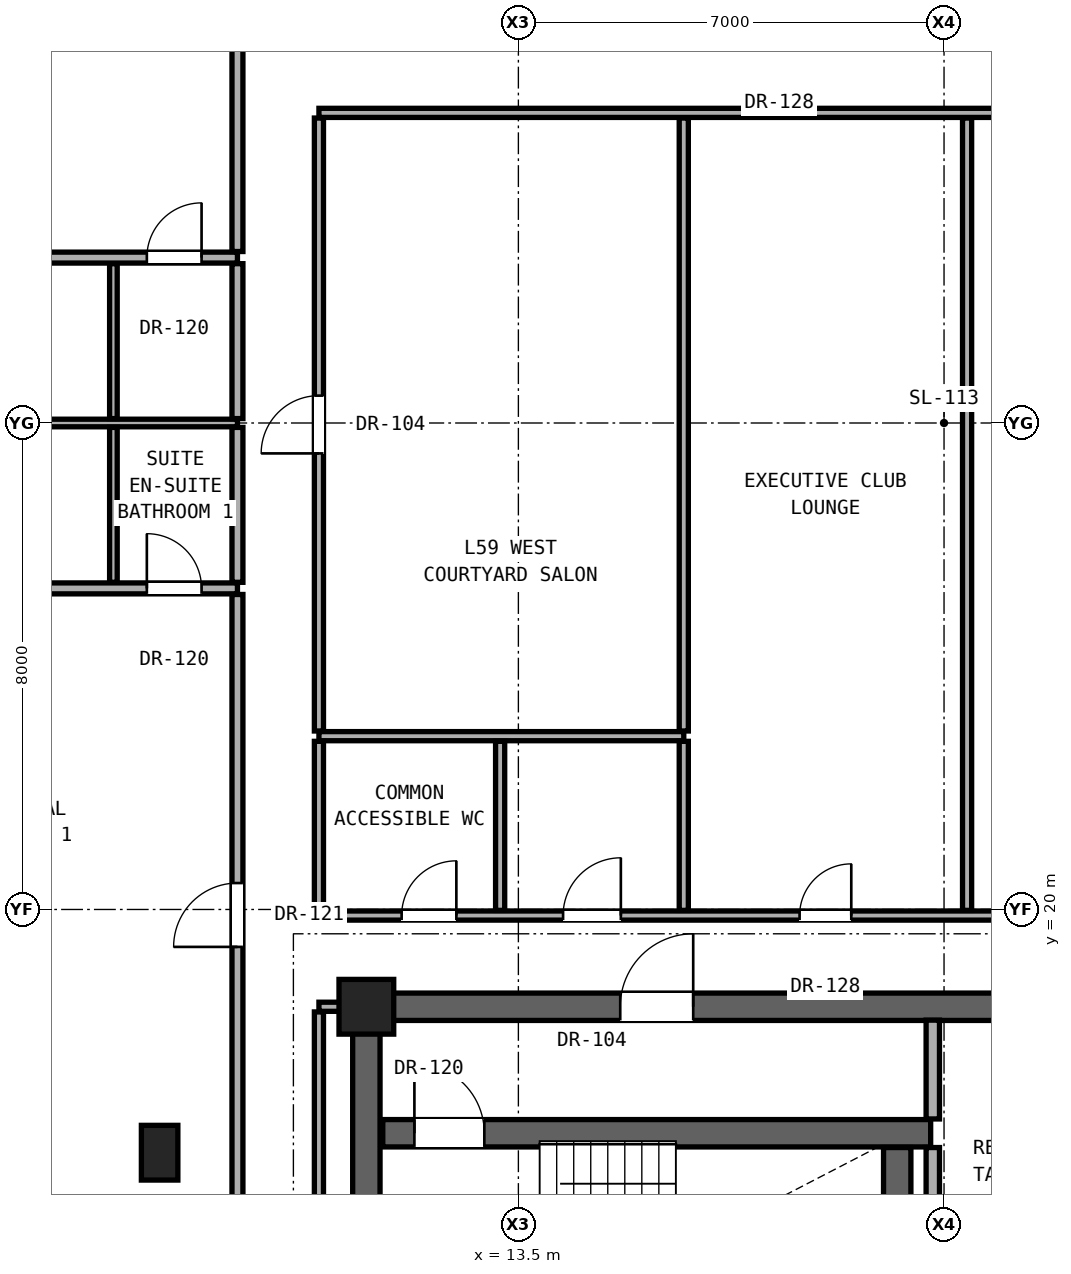
"""IFC4 building model, lengths in metres.
Left out: names, types, materials, properties, quantities, classifications, styles, units other than length and angle.
Written with IfcOpenShell. Run it as: python <this file> out.ifc"""

import sys

from ifc_helpers import new_model, si_unit, direction, frame, frame_2d, origin, origin_2d, place, context, subcontext, project, spatial, rectangle, extrude, element, fill, save


model = new_model("IFC4")
c1 = context("Model", 3, precision=1e-05, world=origin(), true_north=direction((0.0, 1.0)))
c2 = subcontext(c1, "Body", "Model", "MODEL_VIEW")
j1 = project(units=[si_unit("LENGTHUNIT", "METRE"), si_unit("PLANEANGLEUNIT", "RADIAN")], contexts=[c1])
p1 = place(None, origin())
s1 = spatial("IfcSite", under=j1, at=p1, CompositionType="ELEMENT")
p2 = place(p1, origin())
s2 = spatial("IfcBuilding", under=s1, at=p2, CompositionType="ELEMENT")
p3 = place(p2, frame((0.0, 0.0, 206.4)))
s3 = spatial("IfcBuildingStorey", under=s2, at=p3, CompositionType="ELEMENT", Elevation=206.4)
p4 = place(p3, frame((11.0, 18.4, 0.0), z_axis=(0.0, 0.0, 1.0), x_axis=(1.0, 0.0, 0.0)))
e1 = element("IfcColumn", 1, at=p4, inside=s3, PredefinedType="COLUMN", context=c2, shape_type="SweptSolid", body=[
    extrude(rectangle(XDim=0.9, YDim=0.9, at=origin_2d()), origin(), (0.0, 0.0, 1.0), 3.25),
])
p5 = place(p3, frame((7.6, 16.0, 0.0), z_axis=(0.0, 0.0, 1.0), x_axis=(1.0, 0.0, 0.0)))
e2 = element("IfcColumn", 2, at=p5, inside=s3, PredefinedType="PILASTER", context=c2, shape_type="SweptSolid", body=[
    extrude(rectangle(XDim=0.6, YDim=0.9, at=origin_2d()), origin(), (0.0, 0.0, 1.0), 3.25),
])
p6 = place(p3, frame((11.0, 12.4, 0.0), z_axis=(0.0, 0.0, 1.0), x_axis=(0.0, 1.0, 0.0)))
e3 = element("IfcWall", 3, at=p6, inside=s3, PredefinedType="SHEAR", context=c2, shape_type="SweptSolid", body=[
    extrude(rectangle(XDim=6.0, YDim=0.45, at=frame_2d((3.0, 0.0))), origin(), (0.0, 0.0, 1.0), 3.05),
])
p7 = place(p3, frame((11.0, 18.4, 0.0), z_axis=(0.0, 0.0, 1.0), x_axis=(1.0, 0.0, 0.0)))
e4 = element("IfcWall", 4, at=p7, inside=s3, PredefinedType="SHEAR", context=c2, shape_type="SweptSolid", body=[
    extrude(rectangle(XDim=19.0, YDim=0.45, at=frame_2d((9.5, 0.0))), origin(), (0.0, 0.0, 1.0), 3.05),
])
p8 = place(p7, frame((4.175, 0.0, 0.0)))
e5 = element("IfcOpeningElement", 5, at=p8, cuts=e4, PredefinedType="OPENING", context=c2, shape_type="SweptSolid", body=[
    extrude(rectangle(XDim=1.2, YDim=2.25, at=frame_2d((0.6, 1.125))), frame((0.0, 0.235, 0.0), z_axis=(0.0, -1.0, 0.0), x_axis=(1.0, 0.0, 0.0)), (0.0, 0.0, 1.0), 0.47),
])
p9 = place(p7, frame((11.075, 0.0, 0.0)))
e6 = element("IfcOpeningElement", 6, at=p9, cuts=e4, PredefinedType="OPENING", context=c2, shape_type="SweptSolid", body=[
    extrude(rectangle(XDim=0.95, YDim=2.15, at=frame_2d((0.475, 1.075))), frame((0.0, 0.235, 0.0), z_axis=(0.0, -1.0, 0.0), x_axis=(1.0, 0.0, 0.0)), (0.0, 0.0, 1.0), 0.47),
])
p10 = place(p7, frame((14.3, 0.0, 0.0)))
e7 = element("IfcOpeningElement", 7, at=p10, cuts=e4, PredefinedType="OPENING", context=c2, shape_type="SweptSolid", body=[
    extrude(rectangle(XDim=1.3, YDim=2.3, at=frame_2d((0.65, 1.15))), frame((0.0, 0.235, 0.0), z_axis=(0.0, -1.0, 0.0), x_axis=(1.0, 0.0, 0.0)), (0.0, 0.0, 1.0), 0.47),
])
p11 = place(p7, frame((16.6, 0.0, 0.0)))
e8 = element("IfcOpeningElement", 8, at=p11, cuts=e4, PredefinedType="OPENING", context=c2, shape_type="SweptSolid", body=[
    extrude(rectangle(XDim=1.3, YDim=2.3, at=frame_2d((0.65, 1.15))), frame((0.0, 0.235, 0.0), z_axis=(0.0, -1.0, 0.0), x_axis=(1.0, 0.0, 0.0)), (0.0, 0.0, 1.0), 0.47),
])
p12 = place(p3, frame((11.27, 16.32, 0.0), z_axis=(0.0, 0.0, 1.0), x_axis=(1.0, 0.0, 0.0)))
e9 = element("IfcWall", 9, at=p12, inside=s3, PredefinedType="SHEAR", context=c2, shape_type="SweptSolid", body=[
    extrude(rectangle(XDim=9.01, YDim=0.45, at=frame_2d((4.505, 0.0))), origin(), (0.0, 0.0, 1.0), 3.05),
])
p13 = place(p12, frame((0.52, 0.0, 0.0)))
e10 = element("IfcOpeningElement", 10, at=p13, cuts=e9, PredefinedType="OPENING", context=c2, shape_type="SweptSolid", body=[
    extrude(rectangle(XDim=1.15, YDim=2.2, at=frame_2d((0.575, 1.1))), frame((0.0, 0.235, 0.0), z_axis=(0.0, -1.0, 0.0), x_axis=(1.0, 0.0, 0.0)), (0.0, 0.0, 1.0), 0.47),
])
p14 = place(p3, frame((10.22, 18.4, 0.0), z_axis=(0.0, 0.0, 1.0), x_axis=(1.0, 0.0, 0.0)))
e11 = element("IfcWall", 11, at=p14, inside=s3, PredefinedType="PARTITIONING", context=c2, shape_type="SweptSolid", body=[
    extrude(rectangle(XDim=0.56, YDim=0.15, at=frame_2d((0.28, 0.0))), origin(), (0.0, 0.0, 1.0), 2.442),
])
p15 = place(p3, frame((10.22, 19.9, 0.0), z_axis=(0.0, 0.0, 1.0), x_axis=(1.0, 0.0, 0.0)))
e12 = element("IfcWall", 12, at=p15, inside=s3, PredefinedType="PARTITIONING", context=c2, shape_type="SweptSolid", body=[
    extrude(rectangle(XDim=20.56, YDim=0.15, at=frame_2d((10.28, 0.0))), origin(), (0.0, 0.0, 1.0), 2.186),
])
p16 = place(p15, frame((1.36, 0.0, 0.0)))
e13 = element("IfcOpeningElement", 13, at=p16, cuts=e12, PredefinedType="OPENING", context=c2, shape_type="SweptSolid", body=[
    extrude(rectangle(XDim=0.9, YDim=2.1, at=frame_2d((0.45, 1.05))), frame((0.0, 0.085, 0.0), z_axis=(0.0, -1.0, 0.0), x_axis=(1.0, 0.0, 0.0)), (0.0, 0.0, 1.0), 0.17),
])
p17 = place(p15, frame((4.015, 0.0, 0.0)))
e14 = element("IfcOpeningElement", 14, at=p17, cuts=e12, PredefinedType="OPENING", context=c2, shape_type="SweptSolid", body=[
    extrude(rectangle(XDim=0.95, YDim=2.15, at=frame_2d((0.475, 1.075))), frame((0.0, 0.085, 0.0), z_axis=(0.0, -1.0, 0.0), x_axis=(1.0, 0.0, 0.0)), (0.0, 0.0, 1.0), 0.17),
])
p18 = place(p15, frame((7.905, 0.0, 0.0)))
e15 = element("IfcOpeningElement", 15, at=p18, cuts=e12, PredefinedType="OPENING", context=c2, shape_type="SweptSolid", body=[
    extrude(rectangle(XDim=0.85, YDim=2.01, at=frame_2d((0.425, 1.005))), frame((0.0, 0.085, 0.0), z_axis=(0.0, -1.0, 0.0), x_axis=(1.0, 0.0, 0.0)), (0.0, 0.0, 1.0), 0.17),
])
p19 = place(p3, frame((10.22, 22.85, 0.0), z_axis=(0.0, 0.0, 1.0), x_axis=(1.0, 0.0, 0.0)))
e16 = element("IfcWall", 16, at=p19, inside=s3, PredefinedType="PARTITIONING", context=c2, shape_type="SweptSolid", body=[
    extrude(rectangle(XDim=6.0, YDim=0.15, at=frame_2d((3.0, 0.0))), origin(), (0.0, 0.0, 1.0), 2.186),
])
p20 = place(p3, frame((-0.79, 25.28, 0.0), z_axis=(0.0, 0.0, 1.0), x_axis=(1.0, 0.0, 0.0)))
e17 = element("IfcWall", 17, at=p20, inside=s3, PredefinedType="PARTITIONING", context=c2, shape_type="SweptSolid", body=[
    extrude(rectangle(XDim=9.67, YDim=0.18, at=frame_2d((4.835, 0.0))), origin(), (0.0, 0.0, 1.0), 2.269),
])
p21 = place(p20, frame((3.66, 0.0, 0.0)))
e18 = element("IfcOpeningElement", 18, at=p21, cuts=e17, PredefinedType="OPENING", context=c2, shape_type="SweptSolid", body=[
    extrude(rectangle(XDim=0.95, YDim=2.15, at=frame_2d((0.475, 1.075))), frame((0.0, 0.1, 0.0), z_axis=(0.0, -1.0, 0.0), x_axis=(1.0, 0.0, 0.0)), (0.0, 0.0, 1.0), 0.2),
])
p22 = place(p20, frame((8.18, 0.0, 0.0)))
e19 = element("IfcOpeningElement", 19, at=p22, cuts=e17, PredefinedType="OPENING", context=c2, shape_type="SweptSolid", body=[
    extrude(rectangle(XDim=0.9, YDim=2.1, at=frame_2d((0.45, 1.05))), frame((0.0, 0.1, 0.0), z_axis=(0.0, -1.0, 0.0), x_axis=(1.0, 0.0, 0.0)), (0.0, 0.0, 1.0), 0.2),
])
p23 = place(p3, frame((-0.79, 28.0, 0.0), z_axis=(0.0, 0.0, 1.0), x_axis=(1.0, 0.0, 0.0)))
e20 = element("IfcWall", 20, at=p23, inside=s3, PredefinedType="PARTITIONING", context=c2, shape_type="SweptSolid", body=[
    extrude(rectangle(XDim=9.67, YDim=0.125, at=frame_2d((4.835, 0.0))), origin(), (0.0, 0.0, 1.0), 2.269),
])
p24 = place(p3, frame((-0.79, 30.72, 0.0), z_axis=(0.0, 0.0, 1.0), x_axis=(1.0, 0.0, 0.0)))
e21 = element("IfcWall", 21, at=p24, inside=s3, PredefinedType="PARTITIONING", context=c2, shape_type="SweptSolid", body=[
    extrude(rectangle(XDim=9.67, YDim=0.18, at=frame_2d((4.835, 0.0))), origin(), (0.0, 0.0, 1.0), 2.269),
])
p25 = place(p24, frame((3.66, 0.0, 0.0)))
e22 = element("IfcOpeningElement", 22, at=p25, cuts=e21, PredefinedType="OPENING", context=c2, shape_type="SweptSolid", body=[
    extrude(rectangle(XDim=0.95, YDim=2.15, at=frame_2d((0.475, 1.075))), frame((0.0, 0.1, 0.0), z_axis=(0.0, -1.0, 0.0), x_axis=(1.0, 0.0, 0.0)), (0.0, 0.0, 1.0), 0.2),
])
p26 = place(p24, frame((8.18, 0.0, 0.0)))
e23 = element("IfcOpeningElement", 23, at=p26, cuts=e21, PredefinedType="OPENING", context=c2, shape_type="SweptSolid", body=[
    extrude(rectangle(XDim=0.9, YDim=2.1, at=frame_2d((0.45, 1.05))), frame((0.0, 0.1, 0.0), z_axis=(0.0, -1.0, 0.0), x_axis=(1.0, 0.0, 0.0)), (0.0, 0.0, 1.0), 0.2),
])
p27 = place(p3, frame((10.22, 33.1, 0.0), z_axis=(0.0, 0.0, 1.0), x_axis=(1.0, 0.0, 0.0)))
e24 = element("IfcWall", 24, at=p27, inside=s3, PredefinedType="PARTITIONING", context=c2, shape_type="SweptSolid", body=[
    extrude(rectangle(XDim=20.56, YDim=0.15, at=frame_2d((10.28, 0.0))), origin(), (0.0, 0.0, 1.0), 2.186),
])
p28 = place(p27, frame((12.782, 0.0, 0.0)))
e25 = element("IfcOpeningElement", 25, at=p28, cuts=e24, PredefinedType="OPENING", context=c2, shape_type="SweptSolid", body=[
    extrude(rectangle(XDim=0.85, YDim=2.01, at=frame_2d((0.425, 1.005))), frame((0.0, 0.085, 0.0), z_axis=(0.0, -1.0, 0.0), x_axis=(1.0, 0.0, 0.0)), (0.0, 0.0, 1.0), 0.17),
])
p29 = place(p27, frame((17.712, 0.0, 0.0)))
e26 = element("IfcOpeningElement", 26, at=p29, cuts=e24, PredefinedType="OPENING", context=c2, shape_type="SweptSolid", body=[
    extrude(rectangle(XDim=0.85, YDim=2.01, at=frame_2d((0.425, 1.005))), frame((0.0, 0.085, 0.0), z_axis=(0.0, -1.0, 0.0), x_axis=(1.0, 0.0, 0.0)), (0.0, 0.0, 1.0), 0.17),
])
for number, where, z_axis, x_axis in (
    (27, (6.84, 25.38, 0.0), (0.0, 0.0, 1.0), (0.0, 1.0, 0.0)),
    (28, (6.84, 28.073, 0.0), (0.0, 0.0, 1.0), (0.0, 1.0, 0.0)),
):
    element("IfcWall", number, at=place(p3, frame(where, z_axis=z_axis, x_axis=x_axis)), inside=s3, PredefinedType="PARTITIONING", context=c2, shape_type="SweptSolid", body=[
        extrude(rectangle(XDim=2.548, YDim=0.125, at=frame_2d((1.274, 0.0))), origin(), (0.0, 0.0, 1.0), 3.05),
    ])
p30 = place(p3, frame((8.88, 14.639, 0.0), z_axis=(0.0, 0.0, 1.0), x_axis=(0.0, 1.0, 0.0)))
e29 = element("IfcWall", 29, at=p30, inside=s3, PredefinedType="PARTITIONING", context=c2, shape_type="SweptSolid", body=[
    extrude(rectangle(XDim=10.541, YDim=0.18, at=frame_2d((5.271, 0.0))), origin(), (0.0, 0.0, 1.0), 2.346),
])
p31 = place(p30, frame((4.746, 0.0, 0.0)))
e30 = element("IfcOpeningElement", 30, at=p31, cuts=e29, PredefinedType="OPENING", context=c2, shape_type="SweptSolid", body=[
    extrude(rectangle(XDim=1.05, YDim=2.2, at=frame_2d((0.525, 1.1))), frame((0.0, 0.1, 0.0), z_axis=(0.0, -1.0, 0.0), x_axis=(1.0, 0.0, 0.0)), (0.0, 0.0, 1.0), 0.2),
])
for number, where, z_axis, x_axis in (
    (31, (8.88, 25.38, 0.0), (0.0, 0.0, 1.0), (0.0, 1.0, 0.0)),
    (32, (8.88, 28.073, 0.0), (0.0, 0.0, 1.0), (0.0, 1.0, 0.0)),
):
    element("IfcWall", number, at=place(p3, frame(where, z_axis=z_axis, x_axis=x_axis)), inside=s3, PredefinedType="PARTITIONING", context=c2, shape_type="SweptSolid", body=[
        extrude(rectangle(XDim=2.548, YDim=0.18, at=frame_2d((1.274, 0.0))), origin(), (0.0, 0.0, 1.0), 3.05),
    ])
p32 = place(p3, frame((8.88, 30.82, 0.0), z_axis=(0.0, 0.0, 1.0), x_axis=(0.0, 1.0, 0.0)))
e33 = element("IfcWall", 33, at=p32, inside=s3, PredefinedType="PARTITIONING", context=c2, shape_type="SweptSolid", body=[
    extrude(rectangle(XDim=10.541, YDim=0.18, at=frame_2d((5.271, 0.0))), origin(), (0.0, 0.0, 1.0), 2.346),
])
p33 = place(p32, frame((4.746, 0.0, 0.0)))
e34 = element("IfcOpeningElement", 34, at=p33, cuts=e33, PredefinedType="OPENING", context=c2, shape_type="SweptSolid", body=[
    extrude(rectangle(XDim=1.05, YDim=2.2, at=frame_2d((0.525, 1.1))), frame((0.0, 0.1, 0.0), z_axis=(0.0, -1.0, 0.0), x_axis=(1.0, 0.0, 0.0)), (0.0, 0.0, 1.0), 0.2),
])
p34 = place(p3, frame((10.22, 12.335, 0.0), z_axis=(0.0, 0.0, 1.0), x_axis=(0.0, 1.0, 0.0)))
e35 = element("IfcWall", 35, at=p34, inside=s3, PredefinedType="PARTITIONING", context=c2, shape_type="SweptSolid", body=[
    extrude(rectangle(XDim=5.98, YDim=0.15, at=frame_2d((2.99, 0.0))), origin(), (0.0, 0.0, 1.0), 2.442),
])
p35 = place(p3, frame((10.22, 19.985, 0.0), z_axis=(0.0, 0.0, 1.0), x_axis=(0.0, 1.0, 0.0)))
e36 = element("IfcWall", 36, at=p35, inside=s3, PredefinedType="PARTITIONING", context=c2, shape_type="SweptSolid", body=[
    extrude(rectangle(XDim=2.78, YDim=0.15, at=frame_2d((1.39, 0.0))), origin(), (0.0, 0.0, 1.0), 3.05),
])
p36 = place(p3, frame((10.22, 22.935, 0.0), z_axis=(0.0, 0.0, 1.0), x_axis=(0.0, 1.0, 0.0)))
e37 = element("IfcWall", 37, at=p36, inside=s3, PredefinedType="PARTITIONING", context=c2, shape_type="SweptSolid", body=[
    extrude(rectangle(XDim=10.08, YDim=0.15, at=frame_2d((5.04, 0.0))), origin(), (0.0, 0.0, 1.0), 2.346),
])
p37 = place(p36, frame((4.565, 0.0, 0.0)))
e38 = element("IfcOpeningElement", 38, at=p37, cuts=e37, PredefinedType="OPENING", context=c2, shape_type="SweptSolid", body=[
    extrude(rectangle(XDim=0.95, YDim=2.15, at=frame_2d((0.475, 1.075))), frame((0.0, 0.085, 0.0), z_axis=(0.0, -1.0, 0.0), x_axis=(1.0, 0.0, 0.0)), (0.0, 0.0, 1.0), 0.17),
])
for number, where, z_axis, x_axis in (
    (39, (13.2, 19.985, 0.0), (0.0, 0.0, 1.0), (0.0, 1.0, 0.0)),
    (40, (16.22, 19.985, 0.0), (0.0, 0.0, 1.0), (0.0, 1.0, 0.0)),
):
    element("IfcWall", number, at=place(p3, frame(where, z_axis=z_axis, x_axis=x_axis)), inside=s3, PredefinedType="PARTITIONING", context=c2, shape_type="SweptSolid", body=[
        extrude(rectangle(XDim=2.78, YDim=0.15, at=frame_2d((1.39, 0.0))), origin(), (0.0, 0.0, 1.0), 3.05),
    ])
p38 = place(p3, frame((16.22, 22.935, 0.0), z_axis=(0.0, 0.0, 1.0), x_axis=(0.0, 1.0, 0.0)))
e41 = element("IfcWall", 41, at=p38, inside=s3, PredefinedType="PARTITIONING", context=c2, shape_type="SweptSolid", body=[
    extrude(rectangle(XDim=10.08, YDim=0.15, at=frame_2d((5.04, 0.0))), origin(), (0.0, 0.0, 1.0), 2.186),
])
p39 = place(p3, frame((19.73, 13.355, 0.0), z_axis=(0.0, 0.0, 1.0), x_axis=(0.0, 1.0, 0.0)))
e42 = element("IfcWall", 42, at=p39, inside=s3, PredefinedType="SHEAR", context=c2, shape_type="SweptSolid", body=[
    extrude(rectangle(XDim=2.73, YDim=0.45, at=frame_2d((1.365, 0.0))), origin(), (0.0, 0.0, 1.0), 3.05),
])
p40 = place(p3, frame((20.315, 12.885, 0.0), z_axis=(0.0, 0.0, 1.0), x_axis=(0.0, 1.0, 0.0)))
e43 = element("IfcWall", 43, at=p40, inside=s3, PredefinedType="SOLIDWALL", context=c2, shape_type="SweptSolid", body=[
    extrude(rectangle(XDim=3.2, YDim=0.22, at=frame_2d((1.6, 0.0))), origin(), (0.0, 0.0, 1.0), 3.05),
])
p41 = place(p3, frame((20.315, 16.555, 0.0), z_axis=(0.0, 0.0, 1.0), x_axis=(0.0, 1.0, 0.0)))
e44 = element("IfcWall", 44, at=p41, inside=s3, PredefinedType="SOLIDWALL", context=c2, shape_type="SweptSolid", body=[
    extrude(rectangle(XDim=1.625, YDim=0.22, at=frame_2d((0.812, 0.0))), origin(), (0.0, 0.0, 1.0), 3.05),
])
p42 = place(p3, frame((20.879, 19.985, 0.0), z_axis=(0.0, 0.0, 1.0), x_axis=(0.0, 1.0, 0.0)))
e45 = element("IfcWall", 45, at=p42, inside=s3, PredefinedType="PARTITIONING", context=c2, shape_type="SweptSolid", body=[
    extrude(rectangle(XDim=13.03, YDim=0.15, at=frame_2d((6.515, 0.0))), origin(), (0.0, 0.0, 1.0), 2.186),
])
p43 = place(p8, origin())
e46 = element("IfcDoor", 46, at=p43, inside=s3, OperationType="SINGLE_SWING_RIGHT", PredefinedType="DOOR", context=c2, shape_type="SweptSolid", body=[
    extrude(rectangle(XDim=1.2, YDim=2.25, at=frame_2d((0.6, 1.125))), frame((0.0, 0.025, 0.0), z_axis=(0.0, -1.0, 0.0), x_axis=(1.0, 0.0, 0.0)), (0.0, 0.0, 1.0), 0.05),
])
fill(e5, e46)
p44 = place(p13, origin())
e47 = element("IfcDoor", 47, at=p44, inside=s3, OperationType="SINGLE_SWING_LEFT", PredefinedType="DOOR", context=c2, shape_type="SweptSolid", body=[
    extrude(rectangle(XDim=1.15, YDim=2.2, at=frame_2d((0.575, 1.1))), frame((0.0, 0.025, 0.0), z_axis=(0.0, -1.0, 0.0), x_axis=(1.0, 0.0, 0.0)), (0.0, 0.0, 1.0), 0.05),
])
fill(e10, e47)
p45 = place(p16, origin())
e48 = element("IfcDoor", 48, at=p45, inside=s3, OperationType="SINGLE_SWING_RIGHT", PredefinedType="DOOR", context=c2, shape_type="SweptSolid", body=[
    extrude(rectangle(XDim=0.9, YDim=2.1, at=frame_2d((0.45, 1.05))), frame((0.0, 0.025, 0.0), z_axis=(0.0, -1.0, 0.0), x_axis=(1.0, 0.0, 0.0)), (0.0, 0.0, 1.0), 0.05),
])
fill(e13, e48)
p46 = place(p31, origin())
e49 = element("IfcDoor", 49, at=p46, inside=s3, OperationType="SINGLE_SWING_LEFT", PredefinedType="DOOR", context=c2, shape_type="SweptSolid", body=[
    extrude(rectangle(XDim=1.05, YDim=2.2, at=frame_2d((0.525, 1.1))), frame((0.0, 0.025, 0.0), z_axis=(0.0, -1.0, 0.0), x_axis=(1.0, 0.0, 0.0)), (0.0, 0.0, 1.0), 0.05),
])
fill(e30, e49)
p47 = place(p22, origin())
e50 = element("IfcDoor", 50, at=p47, inside=s3, OperationType="SINGLE_SWING_LEFT", PredefinedType="DOOR", context=c2, shape_type="SweptSolid", body=[
    extrude(rectangle(XDim=0.9, YDim=2.1, at=frame_2d((0.45, 1.05))), frame((0.0, 0.025, 0.0), z_axis=(0.0, -1.0, 0.0), x_axis=(1.0, 0.0, 0.0)), (0.0, 0.0, 1.0), 0.05),
])
fill(e19, e50)
p48 = place(p26, origin())
e51 = element("IfcDoor", 51, at=p48, inside=s3, OperationType="SINGLE_SWING_RIGHT", PredefinedType="DOOR", context=c2, shape_type="SweptSolid", body=[
    extrude(rectangle(XDim=0.9, YDim=2.1, at=frame_2d((0.45, 1.05))), frame((0.0, 0.025, 0.0), z_axis=(0.0, -1.0, 0.0), x_axis=(1.0, 0.0, 0.0)), (0.0, 0.0, 1.0), 0.05),
])
fill(e23, e51)
p49 = place(p17, origin())
e52 = element("IfcDoor", 52, at=p49, inside=s3, OperationType="SINGLE_SWING_RIGHT", PredefinedType="DOOR", context=c2, shape_type="SweptSolid", body=[
    extrude(rectangle(XDim=0.95, YDim=2.15, at=frame_2d((0.475, 1.075))), frame((0.0, 0.025, 0.0), z_axis=(0.0, -1.0, 0.0), x_axis=(1.0, 0.0, 0.0)), (0.0, 0.0, 1.0), 0.05),
])
fill(e14, e52)
p50 = place(p37, origin())
e53 = element("IfcDoor", 53, at=p50, inside=s3, OperationType="SINGLE_SWING_LEFT", PredefinedType="DOOR", context=c2, shape_type="SweptSolid", body=[
    extrude(rectangle(XDim=0.95, YDim=2.15, at=frame_2d((0.475, 1.075))), frame((0.0, 0.025, 0.0), z_axis=(0.0, -1.0, 0.0), x_axis=(1.0, 0.0, 0.0)), (0.0, 0.0, 1.0), 0.05),
])
fill(e38, e53)
p51 = place(p18, origin())
e54 = element("IfcDoor", 54, at=p51, inside=s3, OperationType="SINGLE_SWING_RIGHT", PredefinedType="DOOR", context=c2, shape_type="SweptSolid", body=[
    extrude(rectangle(XDim=0.85, YDim=2.01, at=frame_2d((0.425, 1.005))), frame((0.0, 0.025, 0.0), z_axis=(0.0, -1.0, 0.0), x_axis=(1.0, 0.0, 0.0)), (0.0, 0.0, 1.0), 0.05),
])
fill(e15, e54)
save(model, sys.argv[1])
